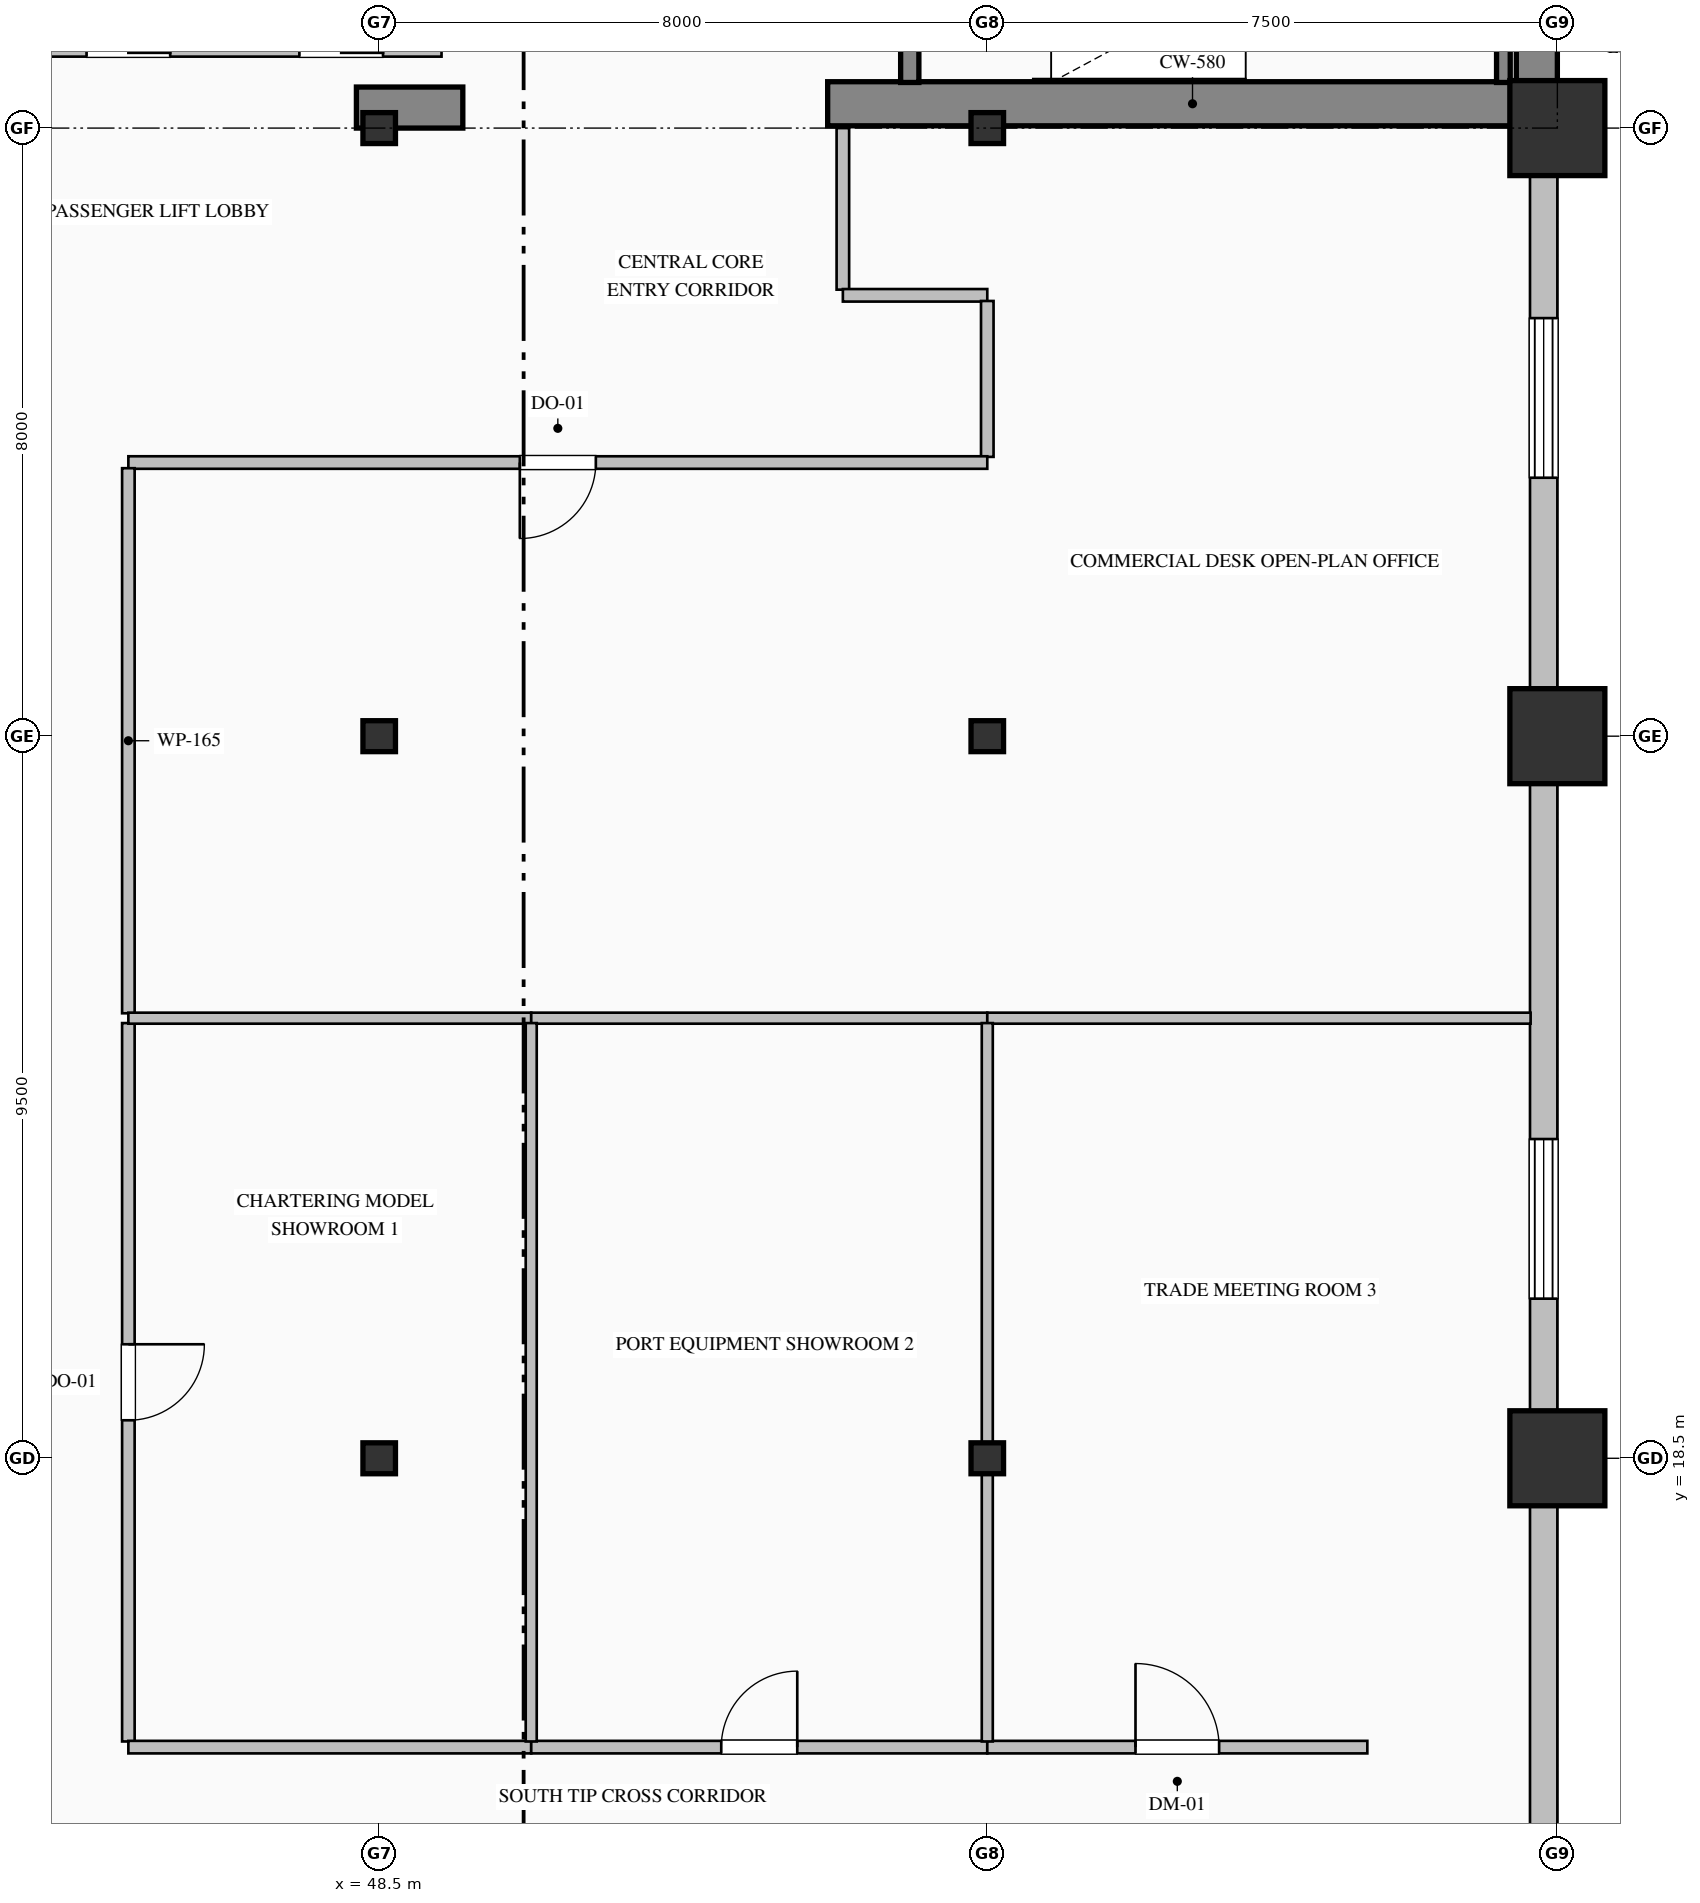
"""IFC4 building model, lengths in metres.
Left out: names, types, materials, properties, quantities, classifications, styles, units other than length and angle.
Written with IfcOpenShell. Run it as: python <this file> out.ifc"""

import sys

from ifc_helpers import new_model, si_unit, direction, frame, frame_2d, origin, origin_2d, place, context, subcontext, project, spatial, rectangle, hollow_rectangle, i_section, extrude, element, fill, save


model = new_model("IFC4")
c1 = context("Model", 3, precision=1e-05, world=origin(), true_north=direction((0.0, 1.0)))
c2 = subcontext(c1, "Body", "Model", "MODEL_VIEW")
j1 = project(units=[si_unit("LENGTHUNIT", "METRE"), si_unit("PLANEANGLEUNIT", "RADIAN")], contexts=[c1])
p1 = place(None, origin())
s1 = spatial("IfcSite", under=j1, at=p1, CompositionType="ELEMENT")
p2 = place(p1, origin())
s2 = spatial("IfcBuilding", under=s1, at=p2, CompositionType="ELEMENT")
p3 = place(p2, frame((0.0, 0.0, 92.2)))
s3 = spatial("IfcBuildingStorey", under=s2, at=p3, CompositionType="ELEMENT", Elevation=92.2)
p4 = place(p3, frame((63.73, 36.32, 0.0), z_axis=(0.0, 0.0, 1.0), x_axis=(0.0, 1.0, 0.0)))
e1 = element("IfcWall", 1, at=p4, inside=s3, PredefinedType="SHEAR", context=c2, shape_type="SweptSolid", body=[
    extrude(rectangle(XDim=15.14, YDim=0.54, at=frame_2d((7.57, 0.0))), origin(), (0.0, 0.0, 1.0), 3.75),
])
p5 = place(p3, frame((48.2, 36.27, 0.0), z_axis=(0.0, 0.0, 1.0), x_axis=(1.0, 0.0, 0.0)))
e2 = element("IfcWall", 2, at=p5, inside=s3, PredefinedType="SHEAR", context=c2, shape_type="SweptSolid", body=[
    extrude(rectangle(XDim=1.4, YDim=0.54, at=frame_2d((0.7, 0.0))), origin(), (0.0, 0.0, 1.0), 3.75),
])
p6 = place(p3, frame((54.4, 36.32, 0.0), z_axis=(0.0, 0.0, 1.0), x_axis=(1.0, 0.0, 0.0)))
e3 = element("IfcWall", 3, at=p6, inside=s3, PredefinedType="SHEAR", context=c2, shape_type="SweptSolid", body=[
    extrude(rectangle(XDim=9.6, YDim=0.58, at=frame_2d((4.8, 0.0))), origin(), (0.0, 0.0, 1.0), 4.0),
])
for number, where, z_axis, x_axis in (
    (4, (48.5, 18.5, 0.0), (0.0, 0.0, 1.0), (1.0, 0.0, 0.0)),
    (5, (48.5, 28.0, 0.0), (0.0, 0.0, 1.0), (1.0, 0.0, 0.0)),
    (6, (48.5, 36.0, 0.0), (0.0, 0.0, 1.0), (1.0, 0.0, 0.0)),
    (7, (56.5, 18.5, 0.0), (0.0, 0.0, 1.0), (1.0, 0.0, 0.0)),
    (8, (56.5, 28.0, 0.0), (0.0, 0.0, 1.0), (1.0, 0.0, 0.0)),
    (9, (56.5, 36.0, 0.0), (0.0, 0.0, 1.0), (1.0, 0.0, 0.0)),
):
    element("IfcColumn", number, at=place(p3, frame(where, z_axis=z_axis, x_axis=x_axis)), inside=s3, PredefinedType="COLUMN", context=c2, shape_type="SweptSolid", body=[
        extrude(i_section(OverallWidth=0.407, OverallDepth=0.428, WebThickness=0.02, FlangeThickness=0.035, FilletRadius=0.022, at=origin_2d()), origin(), (0.0, 0.0, 1.0), 4.0),
    ])
for number, where, z_axis, x_axis in (
    (10, (64.0, 18.5, 0.0), (0.0, 0.0, 1.0), (1.0, 0.0, 0.0)),
    (11, (64.0, 28.0, 0.0), (0.0, 0.0, 1.0), (1.0, 0.0, 0.0)),
    (12, (64.0, 36.0, 0.0), (0.0, 0.0, 1.0), (1.0, 0.0, 0.0)),
):
    element("IfcColumn", number, at=place(p3, frame(where, z_axis=z_axis, x_axis=x_axis)), inside=s3, PredefinedType="COLUMN", context=c2, shape_type="SweptSolid", body=[
        extrude(hollow_rectangle(XDim=1.25, YDim=1.25, WallThickness=0.045, at=origin_2d()), origin(), (0.0, 0.0, 1.0), 4.0),
    ])
p7 = place(p3, frame((63.82, 36.05, 0.0), z_axis=(0.0, 0.0, 1.0), x_axis=(0.0, -1.0, 0.0)))
e13 = element("IfcWall", 13, at=p7, inside=s3, PredefinedType="SOLIDWALL", context=c2, shape_type="SweptSolid", body=[
    extrude(rectangle(XDim=28.05, YDim=0.36, at=frame_2d((14.025, 0.0))), origin(), (0.0, 0.0, 1.0), 3.25),
])
p8 = place(p7, frame((2.55, 0.0, 0.85)))
e14 = element("IfcOpeningElement", 14, at=p8, cuts=e13, PredefinedType="OPENING", context=c2, shape_type="SweptSolid", body=[
    extrude(rectangle(XDim=2.1, YDim=2.05, at=frame_2d((1.05, 1.025))), frame((0.0, 0.19, 0.0), z_axis=(0.0, -1.0, 0.0), x_axis=(1.0, 0.0, 0.0)), (0.0, 0.0, 1.0), 0.38),
])
p9 = place(p7, frame((13.35, 0.0, 0.85)))
e15 = element("IfcOpeningElement", 15, at=p9, cuts=e13, PredefinedType="OPENING", context=c2, shape_type="SweptSolid", body=[
    extrude(rectangle(XDim=2.1, YDim=2.05, at=frame_2d((1.05, 1.025))), frame((0.0, 0.19, 0.0), z_axis=(0.0, -1.0, 0.0), x_axis=(1.0, 0.0, 0.0)), (0.0, 0.0, 1.0), 0.38),
])
p10 = place(p3, frame((55.48, 39.75, 0.0), z_axis=(0.0, 0.0, 1.0), x_axis=(0.0, -1.0, 0.0)))
e16 = element("IfcWall", 16, at=p10, inside=s3, PredefinedType="SOLIDWALL", context=c2, shape_type="SweptSolid", body=[
    extrude(rectangle(XDim=3.15, YDim=0.24, at=frame_2d((1.575, 0.0))), origin(), (0.0, 0.0, 1.0), 4.0),
])
p11 = place(p10, frame((1.0, 0.0, 0.0)))
e17 = element("IfcOpeningElement", 17, at=p11, cuts=e16, PredefinedType="OPENING", context=c2, shape_type="SweptSolid", body=[
    extrude(rectangle(XDim=1.15, YDim=2.2, at=frame_2d((0.575, 1.1))), frame((0.0, 0.13, 0.0), z_axis=(0.0, -1.0, 0.0), x_axis=(1.0, 0.0, 0.0)), (0.0, 0.0, 1.0), 0.26),
])
p12 = place(p3, frame((63.29, 36.6, 0.0), z_axis=(0.0, 0.0, 1.0), x_axis=(0.0, 1.0, 0.0)))
e18 = element("IfcWall", 18, at=p12, inside=s3, PredefinedType="SOLIDWALL", context=c2, shape_type="SweptSolid", body=[
    extrude(rectangle(XDim=3.15, YDim=0.18, at=frame_2d((1.575, 0.0))), origin(), (0.0, 0.0, 1.0), 4.0),
])
p13 = place(p3, frame((49.32, 37.05, 0.0), z_axis=(0.0, 0.0, 1.0), x_axis=(-1.0, 0.0, 0.0)))
e19 = element("IfcWall", 19, at=p13, inside=s3, PredefinedType="PARTITIONING", context=c2, shape_type="SweptSolid", body=[
    extrude(rectangle(XDim=8.24, YDim=0.22, at=frame_2d((4.12, 0.0))), origin(), (0.0, 0.0, 1.0), 3.75),
])
p14 = place(p13, frame((6.37, 0.0, 0.0)))
e20 = element("IfcOpeningElement", 20, at=p14, cuts=e19, PredefinedType="OPENING", context=c2, shape_type="SweptSolid", body=[
    extrude(rectangle(XDim=1.1, YDim=2.2, at=frame_2d((0.55, 1.1))), frame((0.0, 0.12, 0.0), z_axis=(0.0, -1.0, 0.0), x_axis=(1.0, 0.0, 0.0)), (0.0, 0.0, 1.0), 0.24),
])
p15 = place(p13, frame((3.57, 0.0, 0.0)))
e21 = element("IfcOpeningElement", 21, at=p15, cuts=e19, PredefinedType="OPENING", context=c2, shape_type="SweptSolid", body=[
    extrude(rectangle(XDim=1.1, YDim=2.2, at=frame_2d((0.55, 1.1))), frame((0.0, 0.12, 0.0), z_axis=(0.0, -1.0, 0.0), x_axis=(1.0, 0.0, 0.0)), (0.0, 0.0, 1.0), 0.24),
])
p16 = place(p13, frame((0.77, 0.0, 0.0)))
e22 = element("IfcOpeningElement", 22, at=p16, cuts=e19, PredefinedType="OPENING", context=c2, shape_type="SweptSolid", body=[
    extrude(rectangle(XDim=1.1, YDim=2.2, at=frame_2d((0.55, 1.1))), frame((0.0, 0.12, 0.0), z_axis=(0.0, -1.0, 0.0), x_axis=(1.0, 0.0, 0.0)), (0.0, 0.0, 1.0), 0.24),
])
p17 = place(p3, frame((54.6, 36.0, 0.0), z_axis=(0.0, 0.0, 1.0), x_axis=(0.0, -1.0, 0.0)))
e23 = element("IfcWall", 23, at=p17, inside=s3, PredefinedType="PARTITIONING", context=c2, shape_type="SweptSolid", body=[
    extrude(rectangle(XDim=2.125, YDim=0.165, at=frame_2d((1.063, 0.0))), origin(), (0.0, 0.0, 1.0), 3.75),
])
p18 = place(p3, frame((54.6, 33.8, 0.0), z_axis=(0.0, 0.0, 1.0), x_axis=(1.0, 0.0, 0.0)))
e24 = element("IfcWall", 24, at=p18, inside=s3, PredefinedType="PARTITIONING", context=c2, shape_type="SweptSolid", body=[
    extrude(rectangle(XDim=1.9, YDim=0.165, at=frame_2d((0.95, 0.0))), origin(), (0.0, 0.0, 1.0), 3.75),
])
p19 = place(p3, frame((56.5, 33.726, 0.0), z_axis=(0.0, 0.0, 1.0), x_axis=(0.0, -1.0, 0.0)))
e25 = element("IfcWall", 25, at=p19, inside=s3, PredefinedType="PARTITIONING", context=c2, shape_type="SweptSolid", body=[
    extrude(rectangle(XDim=2.051, YDim=0.165, at=frame_2d((1.025, 0.0))), origin(), (0.0, 0.0, 1.0), 3.042),
])
p20 = place(p3, frame((56.5, 31.6, 0.0), z_axis=(0.0, 0.0, 1.0), x_axis=(-1.0, 0.0, 0.0)))
e26 = element("IfcWall", 26, at=p20, inside=s3, PredefinedType="PARTITIONING", context=c2, shape_type="SweptSolid", body=[
    extrude(rectangle(XDim=11.3, YDim=0.165, at=frame_2d((5.65, 0.0))), origin(), (0.0, 0.0, 1.0), 3.75),
])
p21 = place(p20, frame((5.15, 0.0, 0.0)))
e27 = element("IfcOpeningElement", 27, at=p21, cuts=e26, PredefinedType="OPENING", context=c2, shape_type="SweptSolid", body=[
    extrude(rectangle(XDim=1.0, YDim=2.15, at=frame_2d((0.5, 1.075))), frame((0.0, 0.093, 0.0), z_axis=(0.0, -1.0, 0.0), x_axis=(1.0, 0.0, 0.0)), (0.0, 0.0, 1.0), 0.185),
])
p22 = place(p3, frame((45.2, 31.525, 0.0), z_axis=(0.0, 0.0, 1.0), x_axis=(0.0, -1.0, 0.0)))
e28 = element("IfcWall", 28, at=p22, inside=s3, PredefinedType="PARTITIONING", context=c2, shape_type="SweptSolid", body=[
    extrude(rectangle(XDim=7.171, YDim=0.165, at=frame_2d((3.585, 0.0))), origin(), (0.0, 0.0, 1.0), 3.75),
])
p23 = place(p3, frame((45.2, 24.226, 0.0), z_axis=(0.0, 0.0, 1.0), x_axis=(0.0, -1.0, 0.0)))
e29 = element("IfcWall", 29, at=p23, inside=s3, PredefinedType="PARTITIONING", context=c2, shape_type="SweptSolid", body=[
    extrude(rectangle(XDim=9.451, YDim=0.165, at=frame_2d((4.726, 0.0))), origin(), (0.0, 0.0, 1.0), 3.75),
])
p24 = place(p23, frame((4.226, 0.0, 0.0)))
e30 = element("IfcOpeningElement", 30, at=p24, cuts=e29, PredefinedType="OPENING", context=c2, shape_type="SweptSolid", body=[
    extrude(rectangle(XDim=1.0, YDim=2.15, at=frame_2d((0.5, 1.075))), frame((0.0, 0.093, 0.0), z_axis=(0.0, -1.0, 0.0), x_axis=(1.0, 0.0, 0.0)), (0.0, 0.0, 1.0), 0.185),
])
p25 = place(p3, frame((45.2, 14.7, 0.0), z_axis=(0.0, 0.0, 1.0), x_axis=(1.0, 0.0, 0.0)))
e31 = element("IfcWall", 31, at=p25, inside=s3, PredefinedType="PARTITIONING", context=c2, shape_type="SweptSolid", body=[
    extrude(rectangle(XDim=5.3, YDim=0.165, at=frame_2d((2.65, 0.0))), origin(), (0.0, 0.0, 1.0), 3.75),
])
p26 = place(p3, frame((50.5, 14.7, 0.0), z_axis=(0.0, 0.0, 1.0), x_axis=(1.0, 0.0, 0.0)))
e32 = element("IfcWall", 32, at=p26, inside=s3, PredefinedType="PARTITIONING", context=c2, shape_type="SweptSolid", body=[
    extrude(rectangle(XDim=6.0, YDim=0.165, at=frame_2d((3.0, 0.0))), origin(), (0.0, 0.0, 1.0), 3.75),
])
p27 = place(p26, frame((2.5, 0.0, 0.0)))
e33 = element("IfcOpeningElement", 33, at=p27, cuts=e32, PredefinedType="OPENING", context=c2, shape_type="SweptSolid", body=[
    extrude(rectangle(XDim=1.0, YDim=2.15, at=frame_2d((0.5, 1.075))), frame((0.0, 0.093, 0.0), z_axis=(0.0, -1.0, 0.0), x_axis=(1.0, 0.0, 0.0)), (0.0, 0.0, 1.0), 0.185),
])
p28 = place(p3, frame((56.5, 14.7, 0.0), z_axis=(0.0, 0.0, 1.0), x_axis=(1.0, 0.0, 0.0)))
e34 = element("IfcWall", 34, at=p28, inside=s3, PredefinedType="PARTITIONING", context=c2, shape_type="SweptSolid", body=[
    extrude(rectangle(XDim=5.0, YDim=0.165, at=frame_2d((2.5, 0.0))), origin(), (0.0, 0.0, 1.0), 3.75),
])
p29 = place(p28, frame((1.95, 0.0, 0.0)))
e35 = element("IfcOpeningElement", 35, at=p29, cuts=e34, PredefinedType="OPENING", context=c2, shape_type="SweptSolid", body=[
    extrude(rectangle(XDim=1.1, YDim=2.2, at=frame_2d((0.55, 1.1))), frame((0.0, 0.093, 0.0), z_axis=(0.0, -1.0, 0.0), x_axis=(1.0, 0.0, 0.0)), (0.0, 0.0, 1.0), 0.185),
])
p30 = place(p3, frame((50.5, 24.29, 0.0), z_axis=(0.0, 0.0, 1.0), x_axis=(-1.0, 0.0, 0.0)))
e36 = element("IfcWall", 36, at=p30, inside=s3, PredefinedType="PARTITIONING", context=c2, shape_type="SweptSolid", body=[
    extrude(rectangle(XDim=5.3, YDim=0.145, at=frame_2d((2.65, 0.0))), origin(), (0.0, 0.0, 1.0), 3.75),
])
p31 = place(p3, frame((56.5, 24.29, 0.0), z_axis=(0.0, 0.0, 1.0), x_axis=(-1.0, 0.0, 0.0)))
e37 = element("IfcWall", 37, at=p31, inside=s3, PredefinedType="PARTITIONING", context=c2, shape_type="SweptSolid", body=[
    extrude(rectangle(XDim=6.0, YDim=0.145, at=frame_2d((3.0, 0.0))), origin(), (0.0, 0.0, 1.0), 3.75),
])
p32 = place(p3, frame((63.648, 24.29, 0.0), z_axis=(0.0, 0.0, 1.0), x_axis=(-1.0, 0.0, 0.0)))
e38 = element("IfcWall", 38, at=p32, inside=s3, PredefinedType="PARTITIONING", context=c2, shape_type="SweptSolid", body=[
    extrude(rectangle(XDim=7.148, YDim=0.145, at=frame_2d((3.574, 0.0))), origin(), (0.0, 0.0, 1.0), 3.75),
])
p33 = place(p3, frame((50.5, 24.226, 0.0), z_axis=(0.0, 0.0, 1.0), x_axis=(0.0, -1.0, 0.0)))
e39 = element("IfcWall", 39, at=p33, inside=s3, PredefinedType="PARTITIONING", context=c2, shape_type="SweptSolid", body=[
    extrude(rectangle(XDim=9.451, YDim=0.145, at=frame_2d((4.726, 0.0))), origin(), (0.0, 0.0, 1.0), 3.75),
])
p34 = place(p3, frame((56.5, 24.226, 0.0), z_axis=(0.0, 0.0, 1.0), x_axis=(0.0, -1.0, 0.0)))
e40 = element("IfcWall", 40, at=p34, inside=s3, PredefinedType="PARTITIONING", context=c2, shape_type="SweptSolid", body=[
    extrude(rectangle(XDim=9.451, YDim=0.145, at=frame_2d((4.726, 0.0))), origin(), (0.0, 0.0, 1.0), 2.942),
])
p35 = place(p8, origin())
e41 = element("IfcWindow", 41, at=p35, inside=s3, PartitioningType="TRIPLE_PANEL_VERTICAL", PredefinedType="WINDOW", context=c2, shape_type="SweptSolid", body=[
    extrude(rectangle(XDim=2.1, YDim=2.05, at=frame_2d((1.05, 1.025))), frame((0.0, 0.15, 0.0), z_axis=(0.0, -1.0, 0.0), x_axis=(1.0, 0.0, 0.0)), (0.0, 0.0, 1.0), 0.06),
])
fill(e14, e41)
p36 = place(p9, origin())
e42 = element("IfcWindow", 42, at=p36, inside=s3, PartitioningType="TRIPLE_PANEL_VERTICAL", PredefinedType="WINDOW", context=c2, shape_type="SweptSolid", body=[
    extrude(rectangle(XDim=2.1, YDim=2.05, at=frame_2d((1.05, 1.025))), frame((0.0, 0.15, 0.0), z_axis=(0.0, -1.0, 0.0), x_axis=(1.0, 0.0, 0.0)), (0.0, 0.0, 1.0), 0.06),
])
fill(e15, e42)
p37 = place(p21, origin())
e43 = element("IfcDoor", 43, at=p37, inside=s3, OperationType="SINGLE_SWING_RIGHT", PredefinedType="DOOR", context=c2, shape_type="SweptSolid", body=[
    extrude(rectangle(XDim=1.0, YDim=2.15, at=frame_2d((0.5, 1.075))), frame((0.0, 0.025, 0.0), z_axis=(0.0, -1.0, 0.0), x_axis=(1.0, 0.0, 0.0)), (0.0, 0.0, 1.0), 0.05),
])
fill(e27, e43)
p38 = place(p24, origin())
e44 = element("IfcDoor", 44, at=p38, inside=s3, OperationType="SINGLE_SWING_LEFT", PredefinedType="DOOR", context=c2, shape_type="SweptSolid", body=[
    extrude(rectangle(XDim=1.0, YDim=2.15, at=frame_2d((0.5, 1.075))), frame((0.0, 0.025, 0.0), z_axis=(0.0, -1.0, 0.0), x_axis=(1.0, 0.0, 0.0)), (0.0, 0.0, 1.0), 0.05),
])
fill(e30, e44)
p39 = place(p27, origin())
e45 = element("IfcDoor", 45, at=p39, inside=s3, OperationType="SINGLE_SWING_RIGHT", PredefinedType="DOOR", context=c2, shape_type="SweptSolid", body=[
    extrude(rectangle(XDim=1.0, YDim=2.15, at=frame_2d((0.5, 1.075))), frame((0.0, 0.025, 0.0), z_axis=(0.0, -1.0, 0.0), x_axis=(1.0, 0.0, 0.0)), (0.0, 0.0, 1.0), 0.05),
])
fill(e33, e45)
p40 = place(p29, origin())
e46 = element("IfcDoor", 46, at=p40, inside=s3, OperationType="SINGLE_SWING_LEFT", PredefinedType="DOOR", context=c2, shape_type="SweptSolid", body=[
    extrude(rectangle(XDim=1.1, YDim=2.2, at=frame_2d((0.55, 1.1))), frame((0.0, 0.025, 0.0), z_axis=(0.0, -1.0, 0.0), x_axis=(1.0, 0.0, 0.0)), (0.0, 0.0, 1.0), 0.05),
])
fill(e35, e46)
save(model, sys.argv[1])
